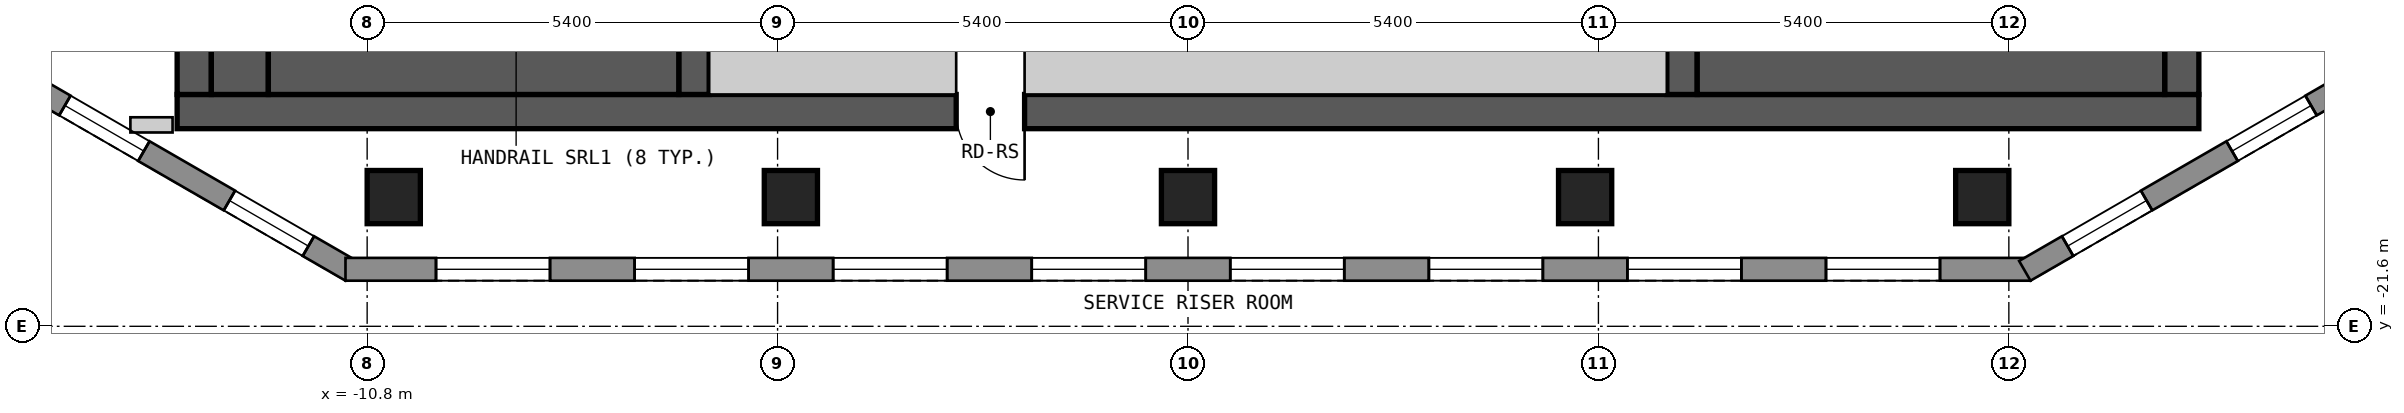
"""IFC4 building model, lengths in metres.
Left out: names, types, materials, properties, quantities, classifications, styles, units other than length and angle.
Written with IfcOpenShell. Run it as: python <this file> out.ifc"""

import sys

from ifc_helpers import new_model, si_unit, direction, frame, frame_2d, origin, origin_2d, place, context, subcontext, project, spatial, polyline, rectangle, outline, extrude, element, fill, save


model = new_model("IFC4")
c1 = context("Model", 3, precision=1e-05, world=origin(), true_north=direction((0.0, 1.0)))
c2 = subcontext(c1, "Body", "Model", "MODEL_VIEW")
j1 = project(units=[si_unit("LENGTHUNIT", "METRE"), si_unit("PLANEANGLEUNIT", "RADIAN")], contexts=[c1])
p1 = place(None, origin())
s1 = spatial("IfcSite", under=j1, at=p1, CompositionType="ELEMENT")
p2 = place(p1, origin())
s2 = spatial("IfcBuilding", under=s1, at=p2, CompositionType="ELEMENT")
p3 = place(p2, frame((0.0, 0.0, 238.8)))
s3 = spatial("IfcBuildingStorey", under=s2, at=p3, CompositionType="ELEMENT", Elevation=238.8)
for number, where, z_axis, x_axis in (
    (1, (-10.45, -19.9, 0.0), (0.0, 0.0, 1.0), (1.0, 0.0, 0.0)),
    (2, (-5.225, -19.9, 0.0), (0.0, 0.0, 1.0), (1.0, 0.0, 0.0)),
    (3, (0.0, -19.9, 0.0), (0.0, 0.0, 1.0), (1.0, 0.0, 0.0)),
    (4, (5.225, -19.9, 0.0), (0.0, 0.0, 1.0), (1.0, 0.0, 0.0)),
    (5, (10.45, -19.9, 0.0), (0.0, 0.0, 1.0), (1.0, 0.0, 0.0)),
):
    element("IfcColumn", number, at=place(p3, frame(where, z_axis=z_axis, x_axis=x_axis)), inside=s3, PredefinedType="COLUMN", context=c2, shape_type="SweptSolid", body=[
        extrude(rectangle(XDim=0.7, YDim=0.7, at=origin_2d()), origin(), (0.0, 0.0, 1.0), 3.0),
    ])
p4 = place(p3, frame((-13.3, -18.775, 0.0), z_axis=(0.0, 0.0, 1.0), x_axis=(1.0, 0.0, 0.0)))
e6 = element("IfcWall", 6, at=p4, inside=s3, PredefinedType="SHEAR", context=c2, shape_type="SweptSolid", body=[
    extrude(rectangle(XDim=26.6, YDim=0.45, at=frame_2d((13.3, 0.0))), origin(), (0.0, 0.0, 1.0), 2.7),
])
p5 = place(p4, frame((10.25, 0.0, 0.0)))
e7 = element("IfcOpeningElement", 7, at=p5, cuts=e6, PredefinedType="OPENING", context=c2, shape_type="SweptSolid", body=[
    extrude(rectangle(XDim=0.9, YDim=2.1, at=frame_2d((0.45, 1.05))), frame((0.0, 0.235, 0.0), z_axis=(0.0, -1.0, 0.0), x_axis=(1.0, 0.0, 0.0)), (0.0, 0.0, 1.0), 0.47),
])
p6 = place(p3, frame((-13.075, -18.55, 0.0), z_axis=(0.0, 0.0, 1.0), x_axis=(0.0, 1.0, 0.0)))
e8 = element("IfcWall", 8, at=p6, inside=s3, PredefinedType="SHEAR", context=c2, shape_type="SweptSolid", body=[
    extrude(rectangle(XDim=13.1, YDim=0.45, at=frame_2d((6.55, 0.0))), origin(), (0.0, 0.0, 1.0), 2.7),
])
p7 = place(p6, frame((4.35, 0.0, 0.0)))
e9 = element("IfcOpeningElement", 9, at=p7, cuts=e8, PredefinedType="OPENING", context=c2, shape_type="SweptSolid", body=[
    extrude(rectangle(XDim=1.2, YDim=2.1, at=frame_2d((0.6, 1.05))), frame((0.0, 0.235, 0.0), z_axis=(0.0, -1.0, 0.0), x_axis=(1.0, 0.0, 0.0)), (0.0, 0.0, 1.0), 0.47),
])
p8 = place(p3, frame((13.075, -18.55, 0.0), z_axis=(0.0, 0.0, 1.0), x_axis=(0.0, 1.0, 0.0)))
e10 = element("IfcWall", 10, at=p8, inside=s3, PredefinedType="SHEAR", context=c2, shape_type="SweptSolid", body=[
    extrude(rectangle(XDim=13.1, YDim=0.45, at=frame_2d((6.55, 0.0))), origin(), (0.0, 0.0, 1.0), 2.7),
])
for number, where, z_axis, x_axis in (
    (11, (-6.5, -18.55, 0.0), (0.0, 0.0, 1.0), (0.0, 1.0, 0.0)),
    (12, (6.5, -18.55, 0.0), (0.0, 0.0, 1.0), (0.0, 1.0, 0.0)),
):
    element("IfcWall", number, at=place(p3, frame(where, z_axis=z_axis, x_axis=x_axis)), inside=s3, PredefinedType="SHEAR", context=c2, shape_type="SweptSolid", body=[
        extrude(rectangle(XDim=3.7, YDim=0.4, at=frame_2d((1.85, 0.0))), origin(), (0.0, 0.0, 1.0), 2.7),
    ])
p9 = place(p3, frame((-15.34, -18.37, 0.0), z_axis=(0.0, 0.0, 1.0), x_axis=(0.866022959057, -0.500004234368, 0.0)))
e13 = element("IfcWall", 13, at=p9, inside=s3, PredefinedType="SOLIDWALL", context=c2, shape_type="SweptSolid", body=[
    extrude(outline(polyline([(0.0, -0.15), (5.0, -0.15), (4.92, 0.15), (0.08, 0.15), (0.0, -0.15)])), origin(), (0.0, 0.0, 1.0), 2.7),
])
p10 = place(p9, frame((0.65, 0.0, 0.15)))
e14 = element("IfcOpeningElement", 14, at=p10, cuts=e13, PredefinedType="OPENING", context=c2, shape_type="SweptSolid", body=[
    extrude(rectangle(XDim=1.2, YDim=2.1, at=frame_2d((0.6, 1.05))), frame((0.0, 0.16, 0.0), z_axis=(0.0, -1.0, 0.0), x_axis=(1.0, 0.0, 0.0)), (0.0, 0.0, 1.0), 0.32),
])
p11 = place(p9, frame((3.15, 0.0, 0.15)))
e15 = element("IfcOpeningElement", 15, at=p11, cuts=e13, PredefinedType="OPENING", context=c2, shape_type="SweptSolid", body=[
    extrude(rectangle(XDim=1.2, YDim=2.1, at=frame_2d((0.6, 1.05))), frame((0.0, 0.16, 0.0), z_axis=(0.0, -1.0, 0.0), x_axis=(1.0, 0.0, 0.0)), (0.0, 0.0, 1.0), 0.32),
])
p12 = place(p3, frame((-11.085, -20.85, 0.0), z_axis=(0.0, 0.0, 1.0), x_axis=(1.0, 0.0, 0.0)))
e16 = element("IfcWall", 16, at=p12, inside=s3, PredefinedType="SOLIDWALL", context=c2, shape_type="SweptSolid", body=[
    extrude(outline(polyline([(0.0, -0.15), (22.17, -0.15), (22.09, 0.15), (0.08, 0.15), (0.0, -0.15)])), origin(), (0.0, 0.0, 1.0), 2.7),
])
p13 = place(p12, frame((1.191, 0.0, 0.15)))
e17 = element("IfcOpeningElement", 17, at=p13, cuts=e16, PredefinedType="OPENING", context=c2, shape_type="SweptSolid", body=[
    extrude(rectangle(XDim=1.5, YDim=2.1, at=frame_2d((0.75, 1.05))), frame((0.0, 0.16, 0.0), z_axis=(0.0, -1.0, 0.0), x_axis=(1.0, 0.0, 0.0)), (0.0, 0.0, 1.0), 0.32),
])
p14 = place(p12, frame((3.804, 0.0, 0.15)))
e18 = element("IfcOpeningElement", 18, at=p14, cuts=e16, PredefinedType="OPENING", context=c2, shape_type="SweptSolid", body=[
    extrude(rectangle(XDim=1.5, YDim=2.1, at=frame_2d((0.75, 1.05))), frame((0.0, 0.16, 0.0), z_axis=(0.0, -1.0, 0.0), x_axis=(1.0, 0.0, 0.0)), (0.0, 0.0, 1.0), 0.32),
])
p15 = place(p12, frame((6.416, 0.0, 0.15)))
e19 = element("IfcOpeningElement", 19, at=p15, cuts=e16, PredefinedType="OPENING", context=c2, shape_type="SweptSolid", body=[
    extrude(rectangle(XDim=1.5, YDim=2.1, at=frame_2d((0.75, 1.05))), frame((0.0, 0.16, 0.0), z_axis=(0.0, -1.0, 0.0), x_axis=(1.0, 0.0, 0.0)), (0.0, 0.0, 1.0), 0.32),
])
p16 = place(p12, frame((9.029, 0.0, 0.15)))
e20 = element("IfcOpeningElement", 20, at=p16, cuts=e16, PredefinedType="OPENING", context=c2, shape_type="SweptSolid", body=[
    extrude(rectangle(XDim=1.5, YDim=2.1, at=frame_2d((0.75, 1.05))), frame((0.0, 0.16, 0.0), z_axis=(0.0, -1.0, 0.0), x_axis=(1.0, 0.0, 0.0)), (0.0, 0.0, 1.0), 0.32),
])
p17 = place(p12, frame((11.641, 0.0, 0.15)))
e21 = element("IfcOpeningElement", 21, at=p17, cuts=e16, PredefinedType="OPENING", context=c2, shape_type="SweptSolid", body=[
    extrude(rectangle(XDim=1.5, YDim=2.1, at=frame_2d((0.75, 1.05))), frame((0.0, 0.16, 0.0), z_axis=(0.0, -1.0, 0.0), x_axis=(1.0, 0.0, 0.0)), (0.0, 0.0, 1.0), 0.32),
])
p18 = place(p12, frame((14.254, 0.0, 0.15)))
e22 = element("IfcOpeningElement", 22, at=p18, cuts=e16, PredefinedType="OPENING", context=c2, shape_type="SweptSolid", body=[
    extrude(rectangle(XDim=1.5, YDim=2.1, at=frame_2d((0.75, 1.05))), frame((0.0, 0.16, 0.0), z_axis=(0.0, -1.0, 0.0), x_axis=(1.0, 0.0, 0.0)), (0.0, 0.0, 1.0), 0.32),
])
p19 = place(p12, frame((16.866, 0.0, 0.15)))
e23 = element("IfcOpeningElement", 23, at=p19, cuts=e16, PredefinedType="OPENING", context=c2, shape_type="SweptSolid", body=[
    extrude(rectangle(XDim=1.5, YDim=2.1, at=frame_2d((0.75, 1.05))), frame((0.0, 0.16, 0.0), z_axis=(0.0, -1.0, 0.0), x_axis=(1.0, 0.0, 0.0)), (0.0, 0.0, 1.0), 0.32),
])
p20 = place(p12, frame((19.479, 0.0, 0.15)))
e24 = element("IfcOpeningElement", 24, at=p20, cuts=e16, PredefinedType="OPENING", context=c2, shape_type="SweptSolid", body=[
    extrude(rectangle(XDim=1.5, YDim=2.1, at=frame_2d((0.75, 1.05))), frame((0.0, 0.16, 0.0), z_axis=(0.0, -1.0, 0.0), x_axis=(1.0, 0.0, 0.0)), (0.0, 0.0, 1.0), 0.32),
])
p21 = place(p3, frame((11.01, -20.87, 0.0), z_axis=(0.0, 0.0, 1.0), x_axis=(0.866022959057, 0.500004234368, 0.0)))
e25 = element("IfcWall", 25, at=p21, inside=s3, PredefinedType="SOLIDWALL", context=c2, shape_type="SweptSolid", body=[
    extrude(outline(polyline([(0.0, -0.15), (5.0, -0.15), (4.92, 0.15), (0.08, 0.15), (0.0, -0.15)])), origin(), (0.0, 0.0, 1.0), 2.7),
])
p22 = place(p21, frame((0.65, 0.0, 0.15)))
e26 = element("IfcOpeningElement", 26, at=p22, cuts=e25, PredefinedType="OPENING", context=c2, shape_type="SweptSolid", body=[
    extrude(rectangle(XDim=1.2, YDim=2.1, at=frame_2d((0.6, 1.05))), frame((0.0, 0.16, 0.0), z_axis=(0.0, -1.0, 0.0), x_axis=(1.0, 0.0, 0.0)), (0.0, 0.0, 1.0), 0.32),
])
p23 = place(p21, frame((3.149, 0.0, 0.15)))
e27 = element("IfcOpeningElement", 27, at=p23, cuts=e25, PredefinedType="OPENING", context=c2, shape_type="SweptSolid", body=[
    extrude(rectangle(XDim=1.2, YDim=2.1, at=frame_2d((0.6, 1.05))), frame((0.0, 0.16, 0.0), z_axis=(0.0, -1.0, 0.0), x_axis=(1.0, 0.0, 0.0)), (0.0, 0.0, 1.0), 0.32),
])
p24 = place(p3, frame((-13.915, -18.95, 0.0), z_axis=(0.0, 0.0, 1.0), x_axis=(1.0, 0.0, 0.0)))
e28 = element("IfcWall", 28, at=p24, inside=s3, PredefinedType="PARTITIONING", context=c2, shape_type="SweptSolid", body=[
    extrude(rectangle(XDim=0.555, YDim=0.2, at=frame_2d((0.277, 0.0))), origin(), (0.0, 0.0, 1.0), 2.7),
])
p25 = place(p3, frame((-12.475, -18.55, 0.0), z_axis=(0.0, 0.0, 1.0), x_axis=(0.0, 1.0, 0.0)))
e29 = element("IfcWall", 29, at=p25, inside=s3, PredefinedType="SOLIDWALL", context=c2, shape_type="SweptSolid", body=[
    extrude(rectangle(XDim=3.7, YDim=0.75, at=frame_2d((1.85, 0.0))), origin(), (0.0, 0.0, 1.0), 2.7),
])
p26 = place(p3, frame((-12.1, -18.175, 0.0), z_axis=(0.0, 0.0, 1.0), x_axis=(1.0, 0.0, 0.0)))
e30 = element("IfcWall", 30, at=p26, inside=s3, PredefinedType="SOLIDWALL", context=c2, shape_type="SweptSolid", body=[
    extrude(rectangle(XDim=5.4, YDim=0.75, at=frame_2d((2.7, 0.0))), origin(), (0.0, 0.0, 1.0), 2.7),
])
p27 = place(p3, frame((-6.3, -18.175, 0.0), z_axis=(0.0, 0.0, 1.0), x_axis=(1.0, 0.0, 0.0)))
e31 = element("IfcWall", 31, at=p27, inside=s3, PredefinedType="PARTITIONING", context=c2, shape_type="SweptSolid", body=[
    extrude(rectangle(XDim=3.25, YDim=0.75, at=frame_2d((1.625, 0.0))), origin(), (0.0, 0.0, 1.0), 2.7),
])
p28 = place(p3, frame((-2.15, -18.175, 0.0), z_axis=(0.0, 0.0, 1.0), x_axis=(1.0, 0.0, 0.0)))
e32 = element("IfcWall", 32, at=p28, inside=s3, PredefinedType="PARTITIONING", context=c2, shape_type="SweptSolid", body=[
    extrude(rectangle(XDim=8.45, YDim=0.75, at=frame_2d((4.225, 0.0))), origin(), (0.0, 0.0, 1.0), 2.7),
])
p29 = place(p3, frame((6.7, -18.075, 0.0), z_axis=(0.0, 0.0, 1.0), x_axis=(1.0, 0.0, 0.0)))
e33 = element("IfcWall", 33, at=p29, inside=s3, PredefinedType="SOLIDWALL", context=c2, shape_type="SweptSolid", body=[
    extrude(rectangle(XDim=6.15, YDim=0.95, at=frame_2d((3.075, 0.0))), origin(), (0.0, 0.0, 1.0), 2.7),
])
p30 = place(p10, origin())
e34 = element("IfcWindow", 34, at=p30, inside=s3, PartitioningType="SINGLE_PANEL", PredefinedType="WINDOW", context=c2, shape_type="SweptSolid", body=[
    extrude(rectangle(XDim=1.2, YDim=2.1, at=frame_2d((0.6, 1.05))), frame((0.0, 0.03, 0.0), z_axis=(0.0, -1.0, 0.0), x_axis=(1.0, 0.0, 0.0)), (0.0, 0.0, 1.0), 0.06),
])
fill(e14, e34)
p31 = place(p11, origin())
e35 = element("IfcWindow", 35, at=p31, inside=s3, PartitioningType="SINGLE_PANEL", PredefinedType="WINDOW", context=c2, shape_type="SweptSolid", body=[
    extrude(rectangle(XDim=1.2, YDim=2.1, at=frame_2d((0.6, 1.05))), frame((0.0, 0.03, 0.0), z_axis=(0.0, -1.0, 0.0), x_axis=(1.0, 0.0, 0.0)), (0.0, 0.0, 1.0), 0.06),
])
fill(e15, e35)
p32 = place(p13, origin())
e36 = element("IfcWindow", 36, at=p32, inside=s3, PartitioningType="SINGLE_PANEL", PredefinedType="WINDOW", context=c2, shape_type="SweptSolid", body=[
    extrude(rectangle(XDim=1.5, YDim=2.1, at=frame_2d((0.75, 1.05))), frame((0.0, 0.03, 0.0), z_axis=(0.0, -1.0, 0.0), x_axis=(1.0, 0.0, 0.0)), (0.0, 0.0, 1.0), 0.06),
])
fill(e17, e36)
p33 = place(p14, origin())
e37 = element("IfcWindow", 37, at=p33, inside=s3, PartitioningType="SINGLE_PANEL", PredefinedType="WINDOW", context=c2, shape_type="SweptSolid", body=[
    extrude(rectangle(XDim=1.5, YDim=2.1, at=frame_2d((0.75, 1.05))), frame((0.0, 0.03, 0.0), z_axis=(0.0, -1.0, 0.0), x_axis=(1.0, 0.0, 0.0)), (0.0, 0.0, 1.0), 0.06),
])
fill(e18, e37)
p34 = place(p15, origin())
e38 = element("IfcWindow", 38, at=p34, inside=s3, PartitioningType="SINGLE_PANEL", PredefinedType="WINDOW", context=c2, shape_type="SweptSolid", body=[
    extrude(rectangle(XDim=1.5, YDim=2.1, at=frame_2d((0.75, 1.05))), frame((0.0, 0.03, 0.0), z_axis=(0.0, -1.0, 0.0), x_axis=(1.0, 0.0, 0.0)), (0.0, 0.0, 1.0), 0.06),
])
fill(e19, e38)
p35 = place(p16, origin())
e39 = element("IfcWindow", 39, at=p35, inside=s3, PartitioningType="SINGLE_PANEL", PredefinedType="WINDOW", context=c2, shape_type="SweptSolid", body=[
    extrude(rectangle(XDim=1.5, YDim=2.1, at=frame_2d((0.75, 1.05))), frame((0.0, 0.03, 0.0), z_axis=(0.0, -1.0, 0.0), x_axis=(1.0, 0.0, 0.0)), (0.0, 0.0, 1.0), 0.06),
])
fill(e20, e39)
p36 = place(p17, origin())
e40 = element("IfcWindow", 40, at=p36, inside=s3, PartitioningType="SINGLE_PANEL", PredefinedType="WINDOW", context=c2, shape_type="SweptSolid", body=[
    extrude(rectangle(XDim=1.5, YDim=2.1, at=frame_2d((0.75, 1.05))), frame((0.0, 0.03, 0.0), z_axis=(0.0, -1.0, 0.0), x_axis=(1.0, 0.0, 0.0)), (0.0, 0.0, 1.0), 0.06),
])
fill(e21, e40)
p37 = place(p18, origin())
e41 = element("IfcWindow", 41, at=p37, inside=s3, PartitioningType="SINGLE_PANEL", PredefinedType="WINDOW", context=c2, shape_type="SweptSolid", body=[
    extrude(rectangle(XDim=1.5, YDim=2.1, at=frame_2d((0.75, 1.05))), frame((0.0, 0.03, 0.0), z_axis=(0.0, -1.0, 0.0), x_axis=(1.0, 0.0, 0.0)), (0.0, 0.0, 1.0), 0.06),
])
fill(e22, e41)
p38 = place(p19, origin())
e42 = element("IfcWindow", 42, at=p38, inside=s3, PartitioningType="SINGLE_PANEL", PredefinedType="WINDOW", context=c2, shape_type="SweptSolid", body=[
    extrude(rectangle(XDim=1.5, YDim=2.1, at=frame_2d((0.75, 1.05))), frame((0.0, 0.03, 0.0), z_axis=(0.0, -1.0, 0.0), x_axis=(1.0, 0.0, 0.0)), (0.0, 0.0, 1.0), 0.06),
])
fill(e23, e42)
p39 = place(p20, origin())
e43 = element("IfcWindow", 43, at=p39, inside=s3, PartitioningType="SINGLE_PANEL", PredefinedType="WINDOW", context=c2, shape_type="SweptSolid", body=[
    extrude(rectangle(XDim=1.5, YDim=2.1, at=frame_2d((0.75, 1.05))), frame((0.0, 0.03, 0.0), z_axis=(0.0, -1.0, 0.0), x_axis=(1.0, 0.0, 0.0)), (0.0, 0.0, 1.0), 0.06),
])
fill(e24, e43)
p40 = place(p22, origin())
e44 = element("IfcWindow", 44, at=p40, inside=s3, PartitioningType="SINGLE_PANEL", PredefinedType="WINDOW", context=c2, shape_type="SweptSolid", body=[
    extrude(rectangle(XDim=1.2, YDim=2.1, at=frame_2d((0.6, 1.05))), frame((0.0, 0.03, 0.0), z_axis=(0.0, -1.0, 0.0), x_axis=(1.0, 0.0, 0.0)), (0.0, 0.0, 1.0), 0.06),
])
fill(e26, e44)
p41 = place(p23, origin())
e45 = element("IfcWindow", 45, at=p41, inside=s3, PartitioningType="SINGLE_PANEL", PredefinedType="WINDOW", context=c2, shape_type="SweptSolid", body=[
    extrude(rectangle(XDim=1.2, YDim=2.1, at=frame_2d((0.6, 1.05))), frame((0.0, 0.03, 0.0), z_axis=(0.0, -1.0, 0.0), x_axis=(1.0, 0.0, 0.0)), (0.0, 0.0, 1.0), 0.06),
])
fill(e27, e45)
p42 = place(p5, origin())
e46 = element("IfcDoor", 46, at=p42, inside=s3, OperationType="SINGLE_SWING_RIGHT", PredefinedType="DOOR", context=c2, shape_type="SweptSolid", body=[
    extrude(rectangle(XDim=0.9, YDim=2.1, at=frame_2d((0.45, 1.05))), frame((0.0, 0.025, 0.0), z_axis=(0.0, -1.0, 0.0), x_axis=(1.0, 0.0, 0.0)), (0.0, 0.0, 1.0), 0.05),
])
fill(e7, e46)
save(model, sys.argv[1])
